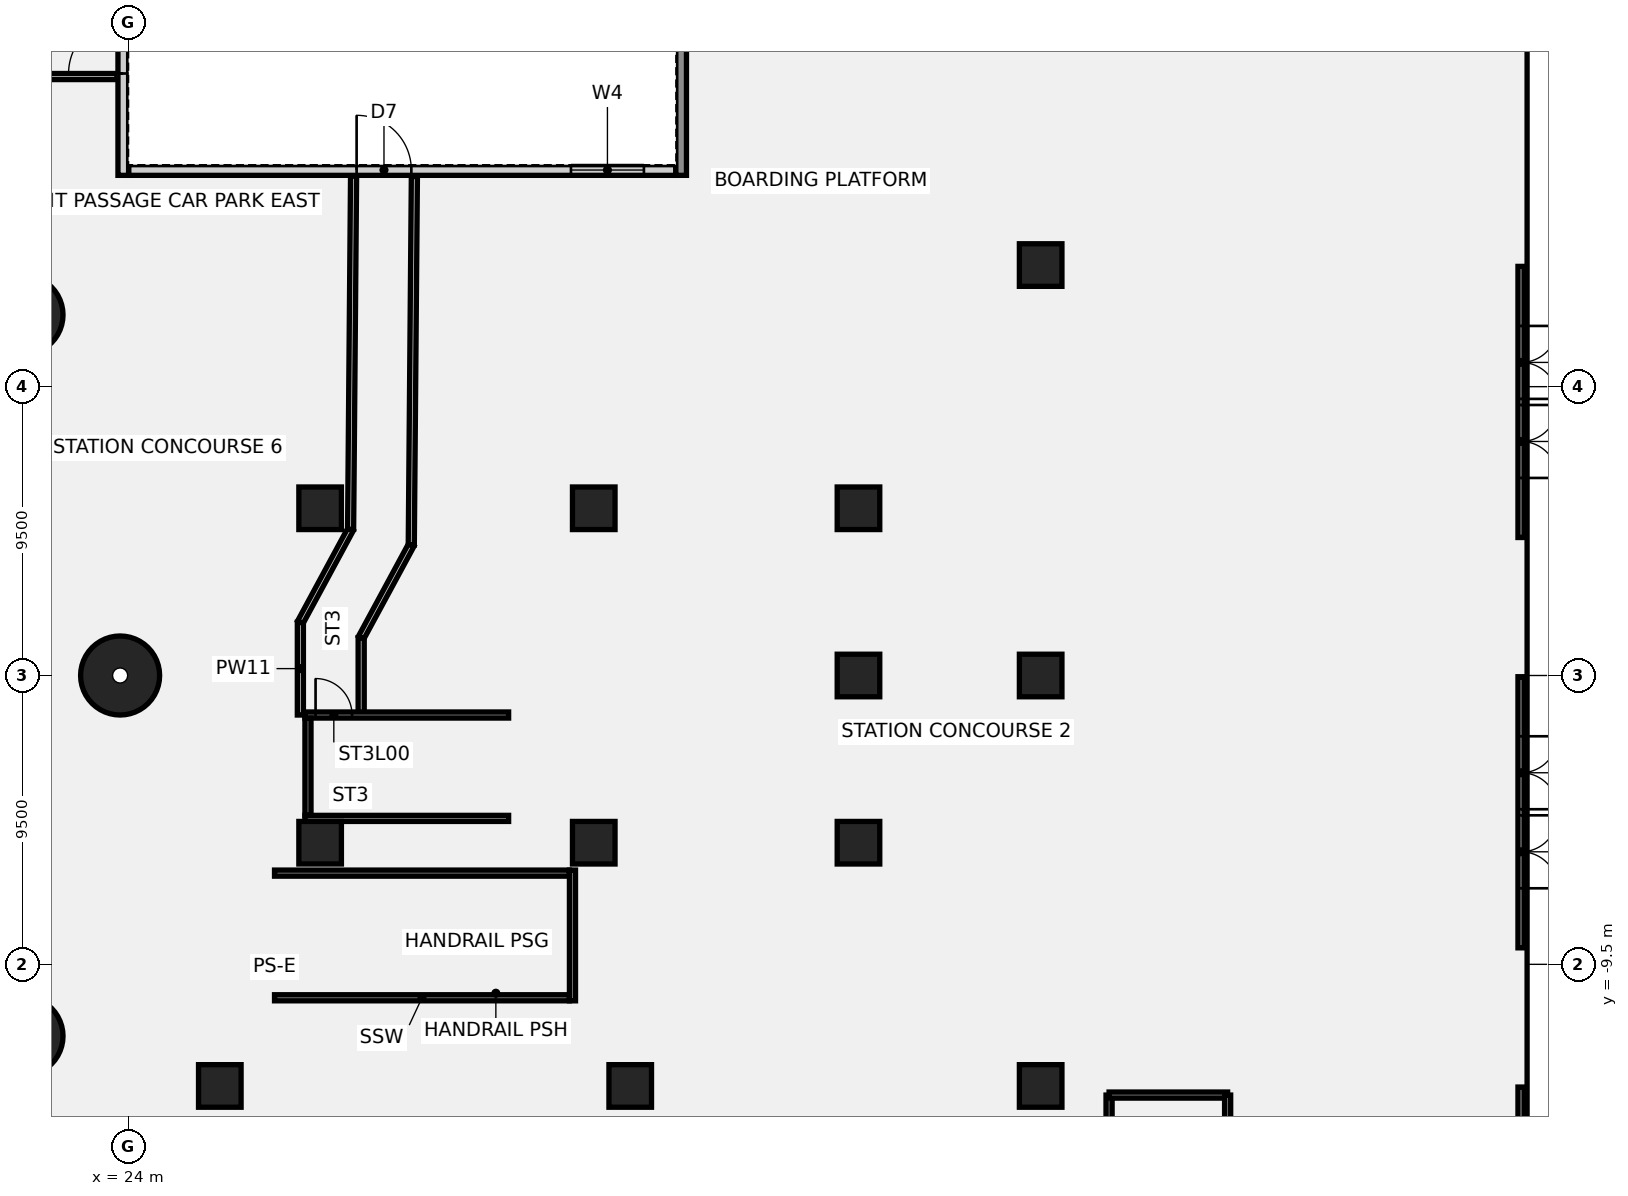
"""IFC4 building model, lengths in metres.
Left out: names, types, materials, properties, quantities, classifications, styles, units other than length and angle.
Written with IfcOpenShell. Run it as: python <this file> out.ifc"""

import sys

from ifc_helpers import new_model, si_unit, direction, frame, frame_2d, origin, origin_2d, place, context, subcontext, project, spatial, polyline, rectangle, circle, outline, extrude, element, fill, save


model = new_model("IFC4")
c1 = context("Model", 3, precision=1e-05, world=origin(), true_north=direction((0.0, 1.0)))
c2 = subcontext(c1, "Body", "Model", "MODEL_VIEW")
j1 = project(units=[si_unit("LENGTHUNIT", "METRE"), si_unit("PLANEANGLEUNIT", "RADIAN")], contexts=[c1])
p1 = place(None, origin())
s1 = spatial("IfcSite", under=j1, at=p1, CompositionType="ELEMENT")
p2 = place(p1, origin())
s2 = spatial("IfcBuilding", under=s1, at=p2, CompositionType="ELEMENT")
p3 = place(p2, origin())
s3 = spatial("IfcBuildingStorey", under=s2, at=p3, CompositionType="ELEMENT", Elevation=0.0)
for number, where, z_axis, x_axis in (
    (1, (23.721, 0.0, -0.55), (0.0, 0.0, 1.0), (1.0, 0.0, 0.0)),
    (2, (20.543, 11.86, -0.55), (0.0, 0.0, 1.0), (1.0, 0.0, 0.0)),
    (3, (20.543, -11.86, -0.55), (0.0, 0.0, 1.0), (1.0, 0.0, 0.0)),
):
    element("IfcColumn", number, at=place(p3, frame(where, z_axis=z_axis, x_axis=x_axis)), inside=s3, PredefinedType="COLUMN", context=c2, shape_type="SweptSolid", body=[
        extrude(circle(Radius=1.3, at=origin_2d()), origin(), (0.0, 0.0, 1.0), 9.05),
    ])
for number, where, z_axis, x_axis in (
    (4, (39.3, 5.5, -0.55), (0.0, 0.0, 1.0), (1.0, 0.0, 0.0)),
    (5, (39.3, -5.5, -0.55), (0.0, 0.0, 1.0), (1.0, 0.0, 0.0)),
    (6, (30.3, 5.5, -0.55), (0.0, 0.0, 1.0), (1.0, 0.0, 0.0)),
    (7, (30.3, -5.5, -0.55), (0.0, 0.0, 1.0), (1.0, 0.0, 0.0)),
    (8, (48.008, -5.5, -0.55), (0.0, 0.0, 1.0), (1.0, 0.0, 0.0)),
    (9, (48.008, 0.0, -0.55), (0.0, 0.0, 1.0), (1.0, 0.0, 0.0)),
    (10, (48.008, 5.5, -0.55), (0.0, 0.0, 1.0), (1.0, 0.0, 0.0)),
    (11, (27.0, -13.5, -0.55), (0.0, 0.0, 1.0), (1.0, 0.0, 0.0)),
    (12, (40.5, -13.5, -0.55), (0.0, 0.0, 1.0), (1.0, 0.0, 0.0)),
    (13, (54.0, -13.5, -0.55), (0.0, 0.0, 1.0), (1.0, 0.0, 0.0)),
    (14, (54.0, 0.0, -0.55), (0.0, 0.0, 1.0), (1.0, 0.0, 0.0)),
    (15, (54.0, 13.5, -0.55), (0.0, 0.0, 1.0), (1.0, 0.0, 0.0)),
):
    element("IfcColumn", number, at=place(p3, frame(where, z_axis=z_axis, x_axis=x_axis)), inside=s3, PredefinedType="COLUMN", context=c2, shape_type="SweptSolid", body=[
        extrude(rectangle(XDim=1.4, YDim=1.4, at=origin_2d()), origin(), (0.0, 0.0, 1.0), 9.05),
    ])
p4 = place(p3, frame((56.25, -25.3, 0.0), z_axis=(0.0, 0.0, 1.0), x_axis=(0.0, 1.0, 0.0)))
e16 = element("IfcWall", 16, at=p4, inside=s3, PredefinedType="PARTITIONING", context=c2, shape_type="SweptSolid", body=[
    extrude(rectangle(XDim=11.5, YDim=0.2, at=frame_2d((5.75, 0.0))), origin(), (0.0, 0.0, 1.0), 8.5),
])
p5 = place(p3, frame((56.25, -13.8, 0.0), z_axis=(0.0, 0.0, 1.0), x_axis=(1.0, 0.0, 0.0)))
e17 = element("IfcWall", 17, at=p5, inside=s3, PredefinedType="PARTITIONING", context=c2, shape_type="SweptSolid", body=[
    extrude(rectangle(XDim=3.9, YDim=0.2, at=frame_2d((1.95, 0.0))), origin(), (0.0, 0.0, 1.0), 8.5),
])
p6 = place(p3, frame((60.15, -25.3, 0.0), z_axis=(0.0, 0.0, 1.0), x_axis=(0.0, 1.0, 0.0)))
e18 = element("IfcWall", 18, at=p6, inside=s3, PredefinedType="PARTITIONING", context=c2, shape_type="SweptSolid", body=[
    extrude(rectangle(XDim=11.5, YDim=0.2, at=frame_2d((5.75, 0.0))), origin(), (0.0, 0.0, 1.0), 8.5),
])
p7 = place(p6, frame((0.352, 0.0, 0.0)))
e19 = element("IfcOpeningElement", 19, at=p7, cuts=e18, PredefinedType="OPENING", context=c2, shape_type="SweptSolid", body=[
    extrude(rectangle(XDim=1.2, YDim=2.1, at=frame_2d((0.6, 1.05))), frame((0.0, 0.11, 0.0), z_axis=(0.0, -1.0, 0.0), x_axis=(1.0, 0.0, 0.0)), (0.0, 0.0, 1.0), 0.22),
])
p8 = place(p3, frame((29.65, -1.3, 0.0), z_axis=(0.0, 0.0, 1.0), x_axis=(0.0, 1.0, 0.0)))
e20 = element("IfcWall", 20, at=p8, inside=s3, PredefinedType="PARTITIONING", context=c2, shape_type="SweptSolid", body=[
    extrude(rectangle(XDim=3.053, YDim=0.2, at=frame_2d((1.527, 0.0))), origin(), (0.0, 0.0, 1.0), 8.5),
])
p9 = place(p3, frame((29.65, 1.753, 0.0), z_axis=(0.0, 0.0, 1.0), x_axis=(0.475809668513, 0.879548270051, 0.0)))
e21 = element("IfcWall", 21, at=p9, inside=s3, PredefinedType="PARTITIONING", context=c2, shape_type="SweptSolid", body=[
    extrude(rectangle(XDim=3.472, YDim=0.2, at=frame_2d((1.736, 0.0))), origin(), (0.0, 0.0, 1.0), 8.5),
])
p10 = place(p3, frame((31.302, 4.807, 0.0), z_axis=(0.0, 0.0, 1.0), x_axis=(0.008423893865, 0.999964518377, 0.0)))
e22 = element("IfcWall", 22, at=p10, inside=s3, PredefinedType="PARTITIONING", context=c2, shape_type="SweptSolid", body=[
    extrude(rectangle(XDim=11.622, YDim=0.2, at=frame_2d((5.811, 0.0))), origin(), (0.0, 0.0, 1.0), 8.5),
])
p11 = place(p3, frame((31.65, -1.3, 0.0), z_axis=(0.0, 0.0, 1.0), x_axis=(0.0, 1.0, 0.0)))
e23 = element("IfcWall", 23, at=p11, inside=s3, PredefinedType="PARTITIONING", context=c2, shape_type="SweptSolid", body=[
    extrude(rectangle(XDim=2.547, YDim=0.2, at=frame_2d((1.273, 0.0))), origin(), (0.0, 0.0, 1.0), 8.5),
])
p12 = place(p3, frame((31.65, 1.247, 0.0), z_axis=(0.0, 0.0, 1.0), x_axis=(0.475826631437, 0.879539093398, 0.0)))
e24 = element("IfcWall", 24, at=p12, inside=s3, PredefinedType="PARTITIONING", context=c2, shape_type="SweptSolid", body=[
    extrude(rectangle(XDim=3.463, YDim=0.2, at=frame_2d((1.732, 0.0))), origin(), (0.0, 0.0, 1.0), 8.5),
])
p13 = place(p3, frame((33.298, 4.293, 0.0), z_axis=(0.0, 0.0, 1.0), x_axis=(0.008420669246, 0.999964545536, 0.0)))
e25 = element("IfcWall", 25, at=p13, inside=s3, PredefinedType="PARTITIONING", context=c2, shape_type="SweptSolid", body=[
    extrude(rectangle(XDim=12.119, YDim=0.2, at=frame_2d((6.06, 0.0))), origin(), (0.0, 0.0, 1.0), 8.5),
])
p14 = place(p3, frame((19.22, 19.7, 0.0), z_axis=(0.0, 0.0, 1.0), x_axis=(1.0, 0.0, 0.0)))
e26 = element("IfcWall", 26, at=p14, inside=s3, PredefinedType="PARTITIONING", context=c2, shape_type="SweptSolid", body=[
    extrude(rectangle(XDim=4.4, YDim=0.2, at=frame_2d((2.2, 0.0))), origin(), (0.0, 0.0, 1.0), 8.5),
])
for number, where, z_axis, x_axis in (
    (27, (28.8, -10.6, 0.0), (0.0, 0.0, 1.0), (1.0, 0.0, 0.0)),
    (28, (28.8, -6.5, 0.0), (0.0, 0.0, 1.0), (1.0, 0.0, 0.0)),
):
    element("IfcWall", number, at=place(p3, frame(where, z_axis=z_axis, x_axis=x_axis)), inside=s3, PredefinedType="SOLIDWALL", context=c2, shape_type="SweptSolid", body=[
        extrude(rectangle(XDim=9.7, YDim=0.2, at=frame_2d((4.85, 0.0))), origin(), (0.0, 0.0, 1.0), 8.5),
    ])
p15 = place(p3, frame((38.6, -10.7, 0.0), z_axis=(0.0, 0.0, 1.0), x_axis=(0.0, 1.0, 0.0)))
e29 = element("IfcWall", 29, at=p15, inside=s3, PredefinedType="SOLIDWALL", context=c2, shape_type="SweptSolid", body=[
    extrude(rectangle(XDim=4.3, YDim=0.2, at=frame_2d((2.15, 0.0))), origin(), (0.0, 0.0, 1.0), 8.5),
])
p16 = place(p3, frame((69.8, -17.955, 0.0), z_axis=(0.0, 0.0, 1.0), x_axis=(0.0, 1.0, 0.0)))
e30 = element("IfcWall", 30, at=p16, inside=s3, PredefinedType="SOLIDWALL", context=c2, shape_type="SweptSolid", body=[
    extrude(rectangle(XDim=4.419, YDim=0.2, at=frame_2d((2.209, 0.0))), origin(), (0.0, 0.0, 1.0), 2.9),
])
p17 = place(p16, frame((1.309, 0.0, 0.0)))
e31 = element("IfcOpeningElement", 31, at=p17, cuts=e30, PredefinedType="OPENING", context=c2, shape_type="SweptSolid", body=[
    extrude(rectangle(XDim=1.8, YDim=2.4, at=frame_2d((0.9, 1.2))), frame((0.0, 0.11, 0.0), z_axis=(0.0, -1.0, 0.0), x_axis=(1.0, 0.0, 0.0)), (0.0, 0.0, 1.0), 0.22),
])
p18 = place(p3, frame((69.8, -8.957, 0.0), z_axis=(0.0, 0.0, 1.0), x_axis=(0.0, 1.0, 0.0)))
e32 = element("IfcWall", 32, at=p18, inside=s3, PredefinedType="SOLIDWALL", context=c2, shape_type="SweptSolid", body=[
    extrude(rectangle(XDim=8.917, YDim=0.2, at=frame_2d((4.458, 0.0))), origin(), (0.0, 0.0, 1.0), 2.9),
])
p19 = place(p18, frame((1.959, 0.0, 0.0)))
e33 = element("IfcOpeningElement", 33, at=p19, cuts=e32, PredefinedType="OPENING", context=c2, shape_type="SweptSolid", body=[
    extrude(rectangle(XDim=2.4, YDim=2.4, at=frame_2d((1.2, 1.2))), frame((0.0, 0.11, 0.0), z_axis=(0.0, -1.0, 0.0), x_axis=(1.0, 0.0, 0.0)), (0.0, 0.0, 1.0), 0.22),
])
p20 = place(p18, frame((4.559, 0.0, 0.0)))
e34 = element("IfcOpeningElement", 34, at=p20, cuts=e32, PredefinedType="OPENING", context=c2, shape_type="SweptSolid", body=[
    extrude(rectangle(XDim=2.4, YDim=2.4, at=frame_2d((1.2, 1.2))), frame((0.0, 0.11, 0.0), z_axis=(0.0, -1.0, 0.0), x_axis=(1.0, 0.0, 0.0)), (0.0, 0.0, 1.0), 0.22),
])
p21 = place(p3, frame((69.8, 4.539, 0.0), z_axis=(0.0, 0.0, 1.0), x_axis=(0.0, 1.0, 0.0)))
e35 = element("IfcWall", 35, at=p21, inside=s3, PredefinedType="SOLIDWALL", context=c2, shape_type="SweptSolid", body=[
    extrude(rectangle(XDim=8.917, YDim=0.2, at=frame_2d((4.459, 0.0))), origin(), (0.0, 0.0, 1.0), 2.9),
])
p22 = place(p21, frame((1.959, 0.0, 0.0)))
e36 = element("IfcOpeningElement", 36, at=p22, cuts=e35, PredefinedType="OPENING", context=c2, shape_type="SweptSolid", body=[
    extrude(rectangle(XDim=2.4, YDim=2.4, at=frame_2d((1.2, 1.2))), frame((0.0, 0.11, 0.0), z_axis=(0.0, -1.0, 0.0), x_axis=(1.0, 0.0, 0.0)), (0.0, 0.0, 1.0), 0.22),
])
p23 = place(p21, frame((4.559, 0.0, 0.0)))
e37 = element("IfcOpeningElement", 37, at=p23, cuts=e35, PredefinedType="OPENING", context=c2, shape_type="SweptSolid", body=[
    extrude(rectangle(XDim=2.4, YDim=2.4, at=frame_2d((1.2, 1.2))), frame((0.0, 0.11, 0.0), z_axis=(0.0, -1.0, 0.0), x_axis=(1.0, 0.0, 0.0)), (0.0, 0.0, 1.0), 0.22),
])
p24 = place(p3, frame((24.0, 16.625, 0.0), z_axis=(0.0, 0.0, 1.0), x_axis=(1.0, 0.0, 0.0)))
e38 = element("IfcWall", 38, at=p24, inside=s3, PredefinedType="SOLIDWALL", context=c2, shape_type="SweptSolid", body=[
    extrude(rectangle(XDim=18.0, YDim=0.35, at=frame_2d((9.0, 0.0))), origin(), (0.0, 0.0, 1.0), 8.5),
])
p25 = place(p24, frame((7.5, 0.0, 0.0)))
e39 = element("IfcOpeningElement", 39, at=p25, cuts=e38, PredefinedType="OPENING", context=c2, shape_type="SweptSolid", body=[
    extrude(rectangle(XDim=1.8, YDim=2.4, at=frame_2d((0.9, 1.2))), frame((0.0, 0.185, 0.0), z_axis=(0.0, -1.0, 0.0), x_axis=(1.0, 0.0, 0.0)), (0.0, 0.0, 1.0), 0.37),
])
p26 = place(p24, frame((14.55, 0.0, 1.0)))
e40 = element("IfcOpeningElement", 40, at=p26, cuts=e38, PredefinedType="OPENING", context=c2, shape_type="SweptSolid", body=[
    extrude(rectangle(XDim=2.4, YDim=1.8, at=frame_2d((1.2, 0.9))), frame((0.0, 0.185, 0.0), z_axis=(0.0, -1.0, 0.0), x_axis=(1.0, 0.0, 0.0)), (0.0, 0.0, 1.0), 0.37),
])
p27 = place(p3, frame((23.825, 16.45, 0.0), z_axis=(0.0, 0.0, 1.0), x_axis=(0.0, 1.0, 0.0)))
e41 = element("IfcWall", 41, at=p27, inside=s3, PredefinedType="SOLIDWALL", context=c2, shape_type="SweptSolid", body=[
    extrude(rectangle(XDim=27.4, YDim=0.35, at=frame_2d((13.7, 0.0))), origin(), (0.0, 0.0, 1.0), 8.5),
])
p28 = place(p27, frame((3.35, 0.0, 0.0)))
e42 = element("IfcOpeningElement", 42, at=p28, cuts=e41, PredefinedType="OPENING", context=c2, shape_type="SweptSolid", body=[
    extrude(rectangle(XDim=1.8, YDim=2.4, at=frame_2d((0.9, 1.2))), frame((0.0, 0.185, 0.0), z_axis=(0.0, -1.0, 0.0), x_axis=(1.0, 0.0, 0.0)), (0.0, 0.0, 1.0), 0.37),
])
p29 = place(p27, frame((24.35, 0.0, 0.0)))
e43 = element("IfcOpeningElement", 43, at=p29, cuts=e41, PredefinedType="OPENING", context=c2, shape_type="SweptSolid", body=[
    extrude(rectangle(XDim=1.8, YDim=2.4, at=frame_2d((0.9, 1.2))), frame((0.0, 0.185, 0.0), z_axis=(0.0, -1.0, 0.0), x_axis=(1.0, 0.0, 0.0)), (0.0, 0.0, 1.0), 0.37),
])
p30 = place(p27, frame((14.9, 0.0, 1.0)))
e44 = element("IfcOpeningElement", 44, at=p30, cuts=e41, PredefinedType="OPENING", context=c2, shape_type="SweptSolid", body=[
    extrude(rectangle(XDim=2.4, YDim=1.8, at=frame_2d((1.2, 0.9))), frame((0.0, 0.185, 0.0), z_axis=(0.0, -1.0, 0.0), x_axis=(1.0, 0.0, 0.0)), (0.0, 0.0, 1.0), 0.37),
])
p31 = place(p3, frame((42.175, 16.45, 0.0), z_axis=(0.0, 0.0, 1.0), x_axis=(0.0, 1.0, 0.0)))
e45 = element("IfcWall", 45, at=p31, inside=s3, PredefinedType="SOLIDWALL", context=c2, shape_type="SweptSolid", body=[
    extrude(rectangle(XDim=16.3, YDim=0.35, at=frame_2d((8.15, 0.0))), origin(), (0.0, 0.0, 1.0), 8.5),
])
p32 = place(p31, frame((4.4, 0.0, 1.0)))
e46 = element("IfcOpeningElement", 46, at=p32, cuts=e45, PredefinedType="OPENING", context=c2, shape_type="SweptSolid", body=[
    extrude(rectangle(XDim=2.4, YDim=1.8, at=frame_2d((1.2, 0.9))), frame((0.0, 0.185, 0.0), z_axis=(0.0, -1.0, 0.0), x_axis=(1.0, 0.0, 0.0)), (0.0, 0.0, 1.0), 0.37),
])
p33 = place(p3, frame((29.8, -1.3, 0.0), z_axis=(0.0, 0.0, 1.0), x_axis=(1.0, 0.0, 0.0)))
e47 = element("IfcWall", 47, at=p33, inside=s3, PredefinedType="SHEAR", context=c2, shape_type="SweptSolid", body=[
    extrude(rectangle(XDim=6.7, YDim=0.2, at=frame_2d((3.35, 0.0))), origin(), (0.0, 0.0, 1.0), 8.5),
])
p34 = place(p33, frame((0.35, 0.0, 0.0)))
e48 = element("IfcOpeningElement", 48, at=p34, cuts=e47, PredefinedType="OPENING", context=c2, shape_type="SweptSolid", body=[
    extrude(rectangle(XDim=1.2, YDim=2.1, at=frame_2d((0.6, 1.05))), frame((0.0, 0.11, 0.0), z_axis=(0.0, -1.0, 0.0), x_axis=(1.0, 0.0, 0.0)), (0.0, 0.0, 1.0), 0.22),
])
p35 = place(p3, frame((29.8, -4.7, 0.0), z_axis=(0.0, 0.0, 1.0), x_axis=(1.0, 0.0, 0.0)))
e49 = element("IfcWall", 49, at=p35, inside=s3, PredefinedType="SHEAR", context=c2, shape_type="SweptSolid", body=[
    extrude(rectangle(XDim=6.7, YDim=0.2, at=frame_2d((3.35, 0.0))), origin(), (0.0, 0.0, 1.0), 8.5),
])
p36 = place(p3, frame((29.9, -4.6, 0.0), z_axis=(0.0, 0.0, 1.0), x_axis=(0.0, 1.0, 0.0)))
e50 = element("IfcWall", 50, at=p36, inside=s3, PredefinedType="SHEAR", context=c2, shape_type="SweptSolid", body=[
    extrude(rectangle(XDim=3.2, YDim=0.2, at=frame_2d((1.6, 0.0))), origin(), (0.0, 0.0, 1.0), 8.5),
])
p37 = place(p3, origin())
e51 = element("IfcWall", 51, at=p37, inside=s3, PredefinedType="SHEAR", context=c2, shape_type="SweptSolid", body=[
    extrude(outline(polyline([(36.3, -4.6), (36.5, -4.6), (36.5, -1.4), (36.3, -1.4), (36.3, -4.6)])), origin(), (0.0, 0.0, 1.0), 8.5),
])
p38 = place(p19, frame((2.4, 0.0, 0.0), z_axis=(0.0, 0.0, 1.0), x_axis=(-1.0, 0.0, 0.0)))
e52 = element("IfcDoor", 52, at=p38, inside=s3, OperationType="DOUBLE_DOOR_DOUBLE_SWING", PredefinedType="DOOR", context=c2, shape_type="SweptSolid", body=[
    extrude(rectangle(XDim=2.4, YDim=2.4, at=frame_2d((1.2, 1.2))), frame((0.0, 0.025, 0.0), z_axis=(0.0, -1.0, 0.0), x_axis=(1.0, 0.0, 0.0)), (0.0, 0.0, 1.0), 0.05),
])
fill(e33, e52)
p39 = place(p20, frame((2.4, 0.0, 0.0), z_axis=(0.0, 0.0, 1.0), x_axis=(-1.0, 0.0, 0.0)))
e53 = element("IfcDoor", 53, at=p39, inside=s3, OperationType="DOUBLE_DOOR_DOUBLE_SWING", PredefinedType="DOOR", context=c2, shape_type="SweptSolid", body=[
    extrude(rectangle(XDim=2.4, YDim=2.4, at=frame_2d((1.2, 1.2))), frame((0.0, 0.025, 0.0), z_axis=(0.0, -1.0, 0.0), x_axis=(1.0, 0.0, 0.0)), (0.0, 0.0, 1.0), 0.05),
])
fill(e34, e53)
p40 = place(p22, frame((2.4, 0.0, 0.0), z_axis=(0.0, 0.0, 1.0), x_axis=(-1.0, 0.0, 0.0)))
e54 = element("IfcDoor", 54, at=p40, inside=s3, OperationType="DOUBLE_DOOR_DOUBLE_SWING", PredefinedType="DOOR", context=c2, shape_type="SweptSolid", body=[
    extrude(rectangle(XDim=2.4, YDim=2.4, at=frame_2d((1.2, 1.2))), frame((0.0, 0.025, 0.0), z_axis=(0.0, -1.0, 0.0), x_axis=(1.0, 0.0, 0.0)), (0.0, 0.0, 1.0), 0.05),
])
fill(e36, e54)
p41 = place(p23, frame((2.4, 0.0, 0.0), z_axis=(0.0, 0.0, 1.0), x_axis=(-1.0, 0.0, 0.0)))
e55 = element("IfcDoor", 55, at=p41, inside=s3, OperationType="DOUBLE_DOOR_DOUBLE_SWING", PredefinedType="DOOR", context=c2, shape_type="SweptSolid", body=[
    extrude(rectangle(XDim=2.4, YDim=2.4, at=frame_2d((1.2, 1.2))), frame((0.0, 0.025, 0.0), z_axis=(0.0, -1.0, 0.0), x_axis=(1.0, 0.0, 0.0)), (0.0, 0.0, 1.0), 0.05),
])
fill(e37, e55)
p42 = place(p25, origin())
e56 = element("IfcDoor", 56, at=p42, inside=s3, OperationType="SINGLE_SWING_LEFT", PredefinedType="DOOR", context=c2, shape_type="SweptSolid", body=[
    extrude(rectangle(XDim=1.8, YDim=2.4, at=frame_2d((0.9, 1.2))), frame((0.0, 0.025, 0.0), z_axis=(0.0, -1.0, 0.0), x_axis=(1.0, 0.0, 0.0)), (0.0, 0.0, 1.0), 0.05),
])
fill(e39, e56)
p43 = place(p26, origin())
e57 = element("IfcWindow", 57, at=p43, inside=s3, PartitioningType="SINGLE_PANEL", PredefinedType="WINDOW", context=c2, shape_type="SweptSolid", body=[
    extrude(rectangle(XDim=2.4, YDim=1.8, at=frame_2d((1.2, 0.9))), frame((0.0, 0.03, 0.0), z_axis=(0.0, -1.0, 0.0), x_axis=(1.0, 0.0, 0.0)), (0.0, 0.0, 1.0), 0.06),
])
fill(e40, e57)
p44 = place(p28, frame((1.8, 0.0, 0.0), z_axis=(0.0, 0.0, 1.0), x_axis=(-1.0, 0.0, 0.0)))
e58 = element("IfcDoor", 58, at=p44, inside=s3, OperationType="SINGLE_SWING_LEFT", PredefinedType="DOOR", context=c2, shape_type="SweptSolid", body=[
    extrude(rectangle(XDim=1.8, YDim=2.4, at=frame_2d((0.9, 1.2))), frame((0.0, 0.025, 0.0), z_axis=(0.0, -1.0, 0.0), x_axis=(1.0, 0.0, 0.0)), (0.0, 0.0, 1.0), 0.05),
])
fill(e42, e58)
p45 = place(p34, origin())
e59 = element("IfcDoor", 59, at=p45, inside=s3, OperationType="SINGLE_SWING_LEFT", PredefinedType="DOOR", context=c2, shape_type="SweptSolid", body=[
    extrude(rectangle(XDim=1.2, YDim=2.1, at=frame_2d((0.6, 1.05))), frame((0.0, 0.025, 0.0), z_axis=(0.0, -1.0, 0.0), x_axis=(1.0, 0.0, 0.0)), (0.0, 0.0, 1.0), 0.05),
])
fill(e48, e59)
save(model, sys.argv[1])
